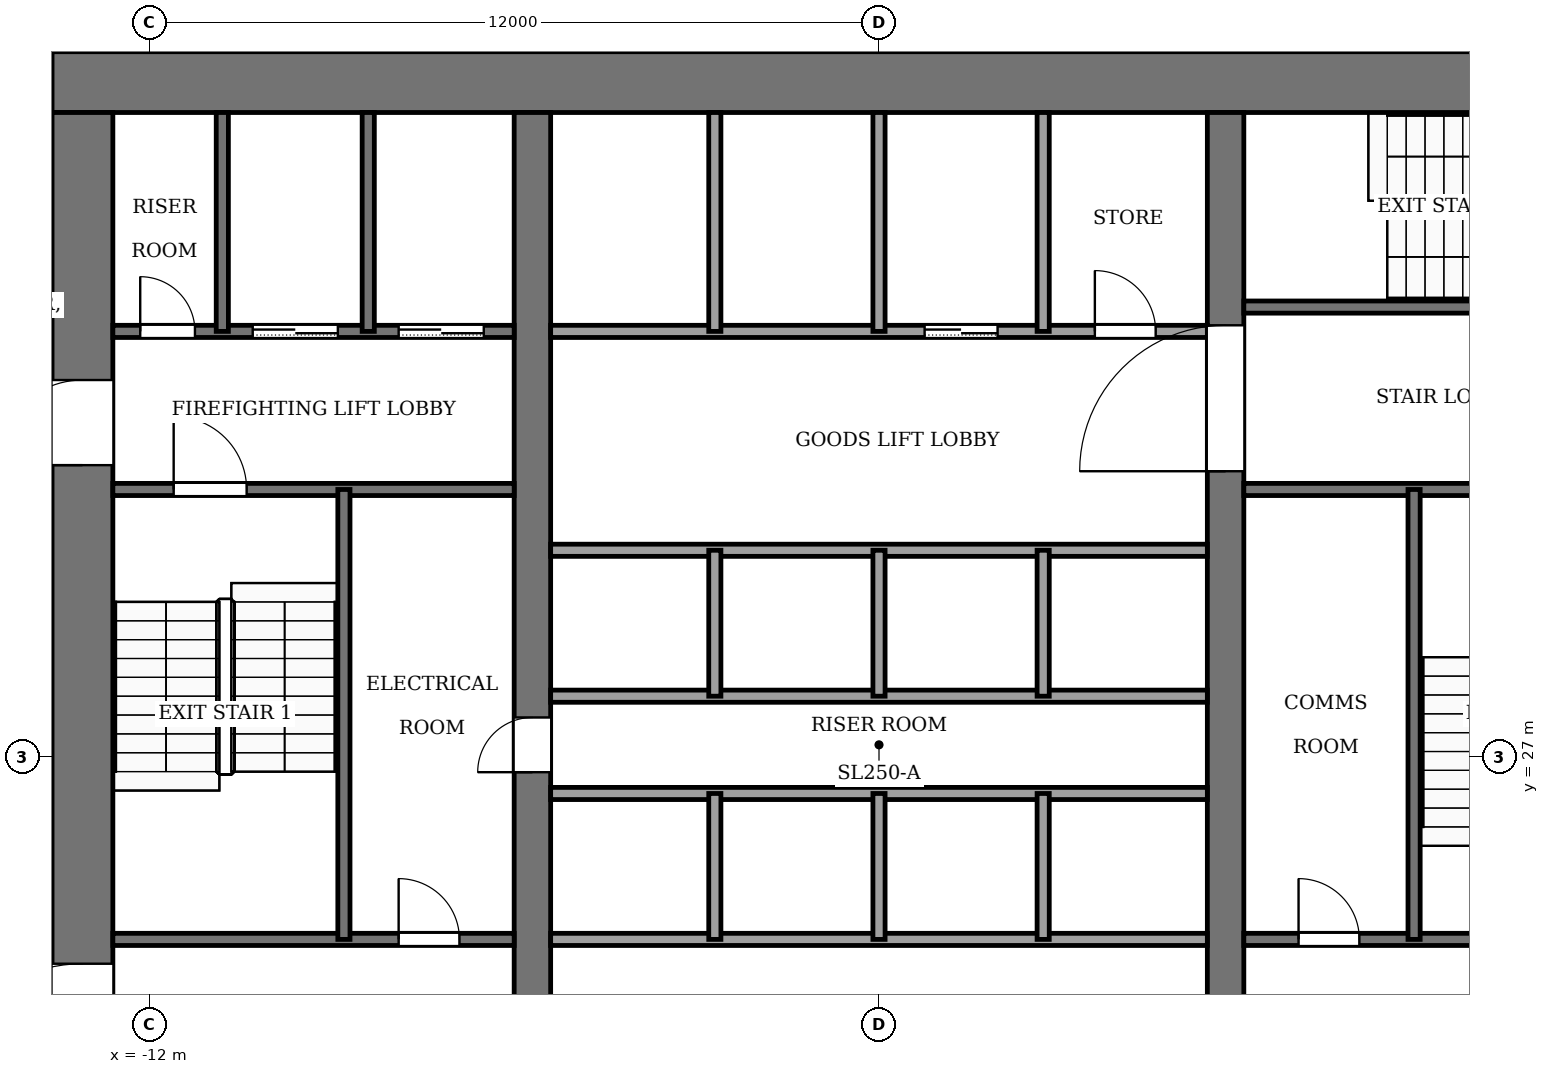
"""IFC4 building model, lengths in metres.
Left out: names, types, materials, properties, quantities, classifications, styles, units other than length and angle.
Written with IfcOpenShell. Run it as: python <this file> out.ifc"""

import sys

from ifc_helpers import new_model, si_unit, direction, frame, frame_2d, origin, place, context, subcontext, project, spatial, rectangle, extrude, element, fill, save


model = new_model("IFC4")
c1 = context("Model", 3, precision=1e-05, world=origin(), true_north=direction((0.0, 1.0)))
c2 = subcontext(c1, "Body", "Model", "MODEL_VIEW")
j1 = project(units=[si_unit("LENGTHUNIT", "METRE"), si_unit("PLANEANGLEUNIT", "RADIAN")], contexts=[c1])
p1 = place(None, origin())
s1 = spatial("IfcSite", under=j1, at=p1, CompositionType="ELEMENT")
p2 = place(p1, origin())
s2 = spatial("IfcBuilding", under=s1, at=p2, CompositionType="ELEMENT")
p3 = place(p2, frame((0.0, 0.0, 170.0)))
s3 = spatial("IfcBuildingStorey", under=s2, at=p3, CompositionType="ELEMENT", Elevation=170.0)
p4 = place(p3, frame((-13.6, 38.1, -0.25), z_axis=(0.0, 0.0, 1.0), x_axis=(1.0, 0.0, 0.0)))
e1 = element("IfcWall", 1, at=p4, inside=s3, PredefinedType="SHEAR", context=c2, shape_type="SweptSolid", body=[
    extrude(rectangle(XDim=27.2, YDim=1.0, at=frame_2d((13.6, 0.0))), origin(), (0.0, 0.0, 1.0), 7.12),
])
p5 = place(p3, frame((-13.1, 18.4, -0.25), z_axis=(0.0, 0.0, 1.0), x_axis=(0.0, 1.0, 0.0)))
e2 = element("IfcWall", 2, at=p5, inside=s3, PredefinedType="SHEAR", context=c2, shape_type="SweptSolid", body=[
    extrude(rectangle(XDim=19.2, YDim=1.0, at=frame_2d((9.6, 0.0))), origin(), (0.0, 0.0, 1.0), 7.12),
])
p6 = place(p5, frame((2.8, 0.0, 0.25)))
e3 = element("IfcOpeningElement", 3, at=p6, cuts=e2, PredefinedType="OPENING", context=c2, shape_type="SweptSolid", body=[
    extrude(rectangle(XDim=2.4, YDim=2.4, at=frame_2d((1.2, 1.2))), frame((0.0, 0.51, 0.0), z_axis=(0.0, -1.0, 0.0), x_axis=(1.0, 0.0, 0.0)), (0.0, 0.0, 1.0), 1.02),
])
p7 = place(p5, frame((13.4, 0.0, 0.25)))
e4 = element("IfcOpeningElement", 4, at=p7, cuts=e2, PredefinedType="OPENING", context=c2, shape_type="SweptSolid", body=[
    extrude(rectangle(XDim=1.4, YDim=2.2, at=frame_2d((0.7, 1.1))), frame((0.0, 0.51, 0.0), z_axis=(0.0, -1.0, 0.0), x_axis=(1.0, 0.0, 0.0)), (0.0, 0.0, 1.0), 1.02),
])
p8 = place(p3, frame((-5.7, 18.4, -0.25), z_axis=(0.0, 0.0, 1.0), x_axis=(0.0, 1.0, 0.0)))
e5 = element("IfcWall", 5, at=p8, inside=s3, PredefinedType="SHEAR", context=c2, shape_type="SweptSolid", body=[
    extrude(rectangle(XDim=19.2, YDim=0.6, at=frame_2d((9.6, 0.0))), origin(), (0.0, 0.0, 1.0), 7.12),
])
p9 = place(p8, frame((8.35, 0.0, 0.25)))
e6 = element("IfcOpeningElement", 6, at=p9, cuts=e5, PredefinedType="OPENING", context=c2, shape_type="SweptSolid", body=[
    extrude(rectangle(XDim=0.9, YDim=2.1, at=frame_2d((0.45, 1.05))), frame((0.0, 0.31, 0.0), z_axis=(0.0, -1.0, 0.0), x_axis=(1.0, 0.0, 0.0)), (0.0, 0.0, 1.0), 0.62),
])
p10 = place(p3, frame((5.7, 18.4, -0.25), z_axis=(0.0, 0.0, 1.0), x_axis=(0.0, 1.0, 0.0)))
e7 = element("IfcWall", 7, at=p10, inside=s3, PredefinedType="SHEAR", context=c2, shape_type="SweptSolid", body=[
    extrude(rectangle(XDim=19.2, YDim=0.6, at=frame_2d((9.6, 0.0))), origin(), (0.0, 0.0, 1.0), 7.12),
])
p11 = place(p10, frame((13.3, 0.0, 0.25)))
e8 = element("IfcOpeningElement", 8, at=p11, cuts=e7, PredefinedType="OPENING", context=c2, shape_type="SweptSolid", body=[
    extrude(rectangle(XDim=2.4, YDim=2.4, at=frame_2d((1.2, 1.2))), frame((0.0, 0.31, 0.0), z_axis=(0.0, -1.0, 0.0), x_axis=(1.0, 0.0, 0.0)), (0.0, 0.0, 1.0), 0.62),
])
p12 = place(p3, frame((-12.6, 24.0, 0.0), z_axis=(0.0, 0.0, 1.0), x_axis=(1.0, 0.0, 0.0)))
e9 = element("IfcWall", 9, at=p12, inside=s3, PredefinedType="PARTITIONING", context=c2, shape_type="SweptSolid", body=[
    extrude(rectangle(XDim=6.6, YDim=0.2, at=frame_2d((3.3, 0.0))), origin(), (0.0, 0.0, 1.0), 6.87),
])
p13 = place(p12, frame((4.7, 0.0, 0.0)))
e10 = element("IfcOpeningElement", 10, at=p13, cuts=e9, PredefinedType="OPENING", context=c2, shape_type="SweptSolid", body=[
    extrude(rectangle(XDim=1.0, YDim=2.1, at=frame_2d((0.5, 1.05))), frame((0.0, 0.11, 0.0), z_axis=(0.0, -1.0, 0.0), x_axis=(1.0, 0.0, 0.0)), (0.0, 0.0, 1.0), 0.22),
])
p14 = place(p3, frame((-5.4, 24.0, 0.0), z_axis=(0.0, 0.0, 1.0), x_axis=(1.0, 0.0, 0.0)))
e11 = element("IfcWall", 11, at=p14, inside=s3, PredefinedType="PARTITIONING", context=c2, shape_type="SweptSolid", body=[
    extrude(rectangle(XDim=10.8, YDim=0.2, at=frame_2d((5.4, 0.0))), origin(), (0.0, 0.0, 1.0), 6.87),
])
p15 = place(p3, frame((6.0, 24.0, 0.0), z_axis=(0.0, 0.0, 1.0), x_axis=(1.0, 0.0, 0.0)))
e12 = element("IfcWall", 12, at=p15, inside=s3, PredefinedType="PARTITIONING", context=c2, shape_type="SweptSolid", body=[
    extrude(rectangle(XDim=6.6, YDim=0.2, at=frame_2d((3.3, 0.0))), origin(), (0.0, 0.0, 1.0), 6.87),
])
p16 = place(p15, frame((0.9, 0.0, 0.0)))
e13 = element("IfcOpeningElement", 13, at=p16, cuts=e12, PredefinedType="OPENING", context=c2, shape_type="SweptSolid", body=[
    extrude(rectangle(XDim=1.0, YDim=2.1, at=frame_2d((0.5, 1.05))), frame((0.0, 0.11, 0.0), z_axis=(0.0, -1.0, 0.0), x_axis=(1.0, 0.0, 0.0)), (0.0, 0.0, 1.0), 0.22),
])
p17 = place(p15, frame((4.4, 0.0, 0.0)))
e14 = element("IfcOpeningElement", 14, at=p17, cuts=e12, PredefinedType="OPENING", context=c2, shape_type="SweptSolid", body=[
    extrude(rectangle(XDim=1.2, YDim=2.2, at=frame_2d((0.6, 1.1))), frame((0.0, 0.11, 0.0), z_axis=(0.0, -1.0, 0.0), x_axis=(1.0, 0.0, 0.0)), (0.0, 0.0, 1.0), 0.22),
])
for number, where, z_axis, x_axis in (
    (15, (-5.4, 26.4, 0.0), (0.0, 0.0, 1.0), (1.0, 0.0, 0.0)),
    (16, (-5.4, 28.0, 0.0), (0.0, 0.0, 1.0), (1.0, 0.0, 0.0)),
    (17, (-5.4, 30.4, 0.0), (0.0, 0.0, 1.0), (1.0, 0.0, 0.0)),
):
    element("IfcWall", number, at=place(p3, frame(where, z_axis=z_axis, x_axis=x_axis)), inside=s3, PredefinedType="PARTITIONING", context=c2, shape_type="SweptSolid", body=[
        extrude(rectangle(XDim=10.8, YDim=0.2, at=frame_2d((5.4, 0.0))), origin(), (0.0, 0.0, 1.0), 6.87),
    ])
p18 = place(p3, frame((-12.6, 31.4, 0.0), z_axis=(0.0, 0.0, 1.0), x_axis=(1.0, 0.0, 0.0)))
e18 = element("IfcWall", 18, at=p18, inside=s3, PredefinedType="PARTITIONING", context=c2, shape_type="SweptSolid", body=[
    extrude(rectangle(XDim=6.6, YDim=0.2, at=frame_2d((3.3, 0.0))), origin(), (0.0, 0.0, 1.0), 6.87),
])
p19 = place(p18, frame((1.0, 0.0, 0.0)))
e19 = element("IfcOpeningElement", 19, at=p19, cuts=e18, PredefinedType="OPENING", context=c2, shape_type="SweptSolid", body=[
    extrude(rectangle(XDim=1.2, YDim=2.2, at=frame_2d((0.6, 1.1))), frame((0.0, 0.11, 0.0), z_axis=(0.0, -1.0, 0.0), x_axis=(1.0, 0.0, 0.0)), (0.0, 0.0, 1.0), 0.22),
])
p20 = place(p3, frame((6.0, 31.4, 0.0), z_axis=(0.0, 0.0, 1.0), x_axis=(1.0, 0.0, 0.0)))
e20 = element("IfcWall", 20, at=p20, inside=s3, PredefinedType="PARTITIONING", context=c2, shape_type="SweptSolid", body=[
    extrude(rectangle(XDim=6.6, YDim=0.2, at=frame_2d((3.3, 0.0))), origin(), (0.0, 0.0, 1.0), 6.87),
])
p21 = place(p3, frame((-12.6, 34.0, 0.0), z_axis=(0.0, 0.0, 1.0), x_axis=(1.0, 0.0, 0.0)))
e21 = element("IfcWall", 21, at=p21, inside=s3, PredefinedType="PARTITIONING", context=c2, shape_type="SweptSolid", body=[
    extrude(rectangle(XDim=6.6, YDim=0.2, at=frame_2d((3.3, 0.0))), origin(), (0.0, 0.0, 1.0), 6.87),
])
p22 = place(p21, frame((4.7, 0.0, 0.0)))
e22 = element("IfcOpeningElement", 22, at=p22, cuts=e21, PredefinedType="OPENING", context=c2, shape_type="SweptSolid", body=[
    extrude(rectangle(XDim=1.4, YDim=2.2, at=frame_2d((0.7, 1.1))), frame((0.0, 0.11, 0.0), z_axis=(0.0, -1.0, 0.0), x_axis=(1.0, 0.0, 0.0)), (0.0, 0.0, 1.0), 0.22),
])
p23 = place(p21, frame((2.3, 0.0, 0.0)))
e23 = element("IfcOpeningElement", 23, at=p23, cuts=e21, PredefinedType="OPENING", context=c2, shape_type="SweptSolid", body=[
    extrude(rectangle(XDim=1.4, YDim=2.2, at=frame_2d((0.7, 1.1))), frame((0.0, 0.11, 0.0), z_axis=(0.0, -1.0, 0.0), x_axis=(1.0, 0.0, 0.0)), (0.0, 0.0, 1.0), 0.22),
])
p24 = place(p21, frame((0.45, 0.0, 0.0)))
e24 = element("IfcOpeningElement", 24, at=p24, cuts=e21, PredefinedType="OPENING", context=c2, shape_type="SweptSolid", body=[
    extrude(rectangle(XDim=0.9, YDim=2.1, at=frame_2d((0.45, 1.05))), frame((0.0, 0.11, 0.0), z_axis=(0.0, -1.0, 0.0), x_axis=(1.0, 0.0, 0.0)), (0.0, 0.0, 1.0), 0.22),
])
p25 = place(p3, frame((-5.4, 34.0, 0.0), z_axis=(0.0, 0.0, 1.0), x_axis=(1.0, 0.0, 0.0)))
e25 = element("IfcWall", 25, at=p25, inside=s3, PredefinedType="PARTITIONING", context=c2, shape_type="SweptSolid", body=[
    extrude(rectangle(XDim=10.8, YDim=0.2, at=frame_2d((5.4, 0.0))), origin(), (0.0, 0.0, 1.0), 6.87),
])
p26 = place(p25, frame((6.15, 0.0, 0.0)))
e26 = element("IfcOpeningElement", 26, at=p26, cuts=e25, PredefinedType="OPENING", context=c2, shape_type="SweptSolid", body=[
    extrude(rectangle(XDim=1.2, YDim=2.2, at=frame_2d((0.6, 1.1))), frame((0.0, 0.11, 0.0), z_axis=(0.0, -1.0, 0.0), x_axis=(1.0, 0.0, 0.0)), (0.0, 0.0, 1.0), 0.22),
])
p27 = place(p25, frame((8.95, 0.0, 0.0)))
e27 = element("IfcOpeningElement", 27, at=p27, cuts=e25, PredefinedType="OPENING", context=c2, shape_type="SweptSolid", body=[
    extrude(rectangle(XDim=1.0, YDim=2.1, at=frame_2d((0.5, 1.05))), frame((0.0, 0.11, 0.0), z_axis=(0.0, -1.0, 0.0), x_axis=(1.0, 0.0, 0.0)), (0.0, 0.0, 1.0), 0.22),
])
p28 = place(p3, frame((6.0, 34.4, 0.0), z_axis=(0.0, 0.0, 1.0), x_axis=(1.0, 0.0, 0.0)))
e28 = element("IfcWall", 28, at=p28, inside=s3, PredefinedType="PARTITIONING", context=c2, shape_type="SweptSolid", body=[
    extrude(rectangle(XDim=6.6, YDim=0.2, at=frame_2d((3.3, 0.0))), origin(), (0.0, 0.0, 1.0), 6.87),
])
p29 = place(p28, frame((4.8, 0.0, 0.0)))
e29 = element("IfcOpeningElement", 29, at=p29, cuts=e28, PredefinedType="OPENING", context=c2, shape_type="SweptSolid", body=[
    extrude(rectangle(XDim=1.2, YDim=2.2, at=frame_2d((0.6, 1.1))), frame((0.0, 0.11, 0.0), z_axis=(0.0, -1.0, 0.0), x_axis=(1.0, 0.0, 0.0)), (0.0, 0.0, 1.0), 0.22),
])
p30 = place(p3, frame((-10.8, 34.0, 0.0), z_axis=(0.0, 0.0, 1.0), x_axis=(0.0, 1.0, 0.0)))
e30 = element("IfcWall", 30, at=p30, inside=s3, PredefinedType="PARTITIONING", context=c2, shape_type="SweptSolid", body=[
    extrude(rectangle(XDim=3.6, YDim=0.2, at=frame_2d((1.8, 0.0))), origin(), (0.0, 0.0, 1.0), 6.87),
])
p31 = place(p3, frame((-8.8, 24.0, 0.0), z_axis=(0.0, 0.0, 1.0), x_axis=(0.0, 1.0, 0.0)))
e31 = element("IfcWall", 31, at=p31, inside=s3, PredefinedType="PARTITIONING", context=c2, shape_type="SweptSolid", body=[
    extrude(rectangle(XDim=7.4, YDim=0.2, at=frame_2d((3.7, 0.0))), origin(), (0.0, 0.0, 1.0), 6.87),
])
p32 = place(p3, frame((-8.4, 34.0, 0.0), z_axis=(0.0, 0.0, 1.0), x_axis=(0.0, 1.0, 0.0)))
e32 = element("IfcWall", 32, at=p32, inside=s3, PredefinedType="PARTITIONING", context=c2, shape_type="SweptSolid", body=[
    extrude(rectangle(XDim=3.6, YDim=0.2, at=frame_2d((1.8, 0.0))), origin(), (0.0, 0.0, 1.0), 6.87),
])
for number, where, z_axis, x_axis in (
    (33, (-2.7, 24.0, 0.0), (0.0, 0.0, 1.0), (0.0, 1.0, 0.0)),
    (34, (-2.7, 28.0, 0.0), (0.0, 0.0, 1.0), (0.0, 1.0, 0.0)),
):
    element("IfcWall", number, at=place(p3, frame(where, z_axis=z_axis, x_axis=x_axis)), inside=s3, PredefinedType="PARTITIONING", context=c2, shape_type="SweptSolid", body=[
        extrude(rectangle(XDim=2.4, YDim=0.2, at=frame_2d((1.2, 0.0))), origin(), (0.0, 0.0, 1.0), 6.87),
    ])
p33 = place(p3, frame((-2.7, 34.0, 0.0), z_axis=(0.0, 0.0, 1.0), x_axis=(0.0, 1.0, 0.0)))
e35 = element("IfcWall", 35, at=p33, inside=s3, PredefinedType="PARTITIONING", context=c2, shape_type="SweptSolid", body=[
    extrude(rectangle(XDim=3.6, YDim=0.2, at=frame_2d((1.8, 0.0))), origin(), (0.0, 0.0, 1.0), 6.87),
])
for number, where, z_axis, x_axis in (
    (36, (0.0, 24.0, 0.0), (0.0, 0.0, 1.0), (0.0, 1.0, 0.0)),
    (37, (0.0, 28.0, 0.0), (0.0, 0.0, 1.0), (0.0, 1.0, 0.0)),
):
    element("IfcWall", number, at=place(p3, frame(where, z_axis=z_axis, x_axis=x_axis)), inside=s3, PredefinedType="PARTITIONING", context=c2, shape_type="SweptSolid", body=[
        extrude(rectangle(XDim=2.4, YDim=0.2, at=frame_2d((1.2, 0.0))), origin(), (0.0, 0.0, 1.0), 6.87),
    ])
p34 = place(p3, frame((0.0, 34.0, 0.0), z_axis=(0.0, 0.0, 1.0), x_axis=(0.0, 1.0, 0.0)))
e38 = element("IfcWall", 38, at=p34, inside=s3, PredefinedType="PARTITIONING", context=c2, shape_type="SweptSolid", body=[
    extrude(rectangle(XDim=3.6, YDim=0.2, at=frame_2d((1.8, 0.0))), origin(), (0.0, 0.0, 1.0), 6.87),
])
for number, where, z_axis, x_axis in (
    (39, (2.7, 24.0, 0.0), (0.0, 0.0, 1.0), (0.0, 1.0, 0.0)),
    (40, (2.7, 28.0, 0.0), (0.0, 0.0, 1.0), (0.0, 1.0, 0.0)),
):
    element("IfcWall", number, at=place(p3, frame(where, z_axis=z_axis, x_axis=x_axis)), inside=s3, PredefinedType="PARTITIONING", context=c2, shape_type="SweptSolid", body=[
        extrude(rectangle(XDim=2.4, YDim=0.2, at=frame_2d((1.2, 0.0))), origin(), (0.0, 0.0, 1.0), 6.87),
    ])
p35 = place(p3, frame((2.7, 34.0, 0.0), z_axis=(0.0, 0.0, 1.0), x_axis=(0.0, 1.0, 0.0)))
e41 = element("IfcWall", 41, at=p35, inside=s3, PredefinedType="PARTITIONING", context=c2, shape_type="SweptSolid", body=[
    extrude(rectangle(XDim=3.6, YDim=0.2, at=frame_2d((1.8, 0.0))), origin(), (0.0, 0.0, 1.0), 6.87),
])
p36 = place(p3, frame((8.8, 24.0, 0.0), z_axis=(0.0, 0.0, 1.0), x_axis=(0.0, 1.0, 0.0)))
e42 = element("IfcWall", 42, at=p36, inside=s3, PredefinedType="PARTITIONING", context=c2, shape_type="SweptSolid", body=[
    extrude(rectangle(XDim=7.4, YDim=0.2, at=frame_2d((3.7, 0.0))), origin(), (0.0, 0.0, 1.0), 6.87),
])
p37 = place(p26, origin())
e43 = element("IfcDoor", 43, at=p37, inside=s3, OperationType="SLIDING_TO_LEFT", PredefinedType="DOOR", context=c2, shape_type="SweptSolid", body=[
    extrude(rectangle(XDim=1.2, YDim=2.2, at=frame_2d((0.6, 1.1))), frame((0.0, 0.025, 0.0), z_axis=(0.0, -1.0, 0.0), x_axis=(1.0, 0.0, 0.0)), (0.0, 0.0, 1.0), 0.05),
])
fill(e26, e43)
p38 = place(p22, origin())
e44 = element("IfcDoor", 44, at=p38, inside=s3, OperationType="SLIDING_TO_LEFT", PredefinedType="DOOR", context=c2, shape_type="SweptSolid", body=[
    extrude(rectangle(XDim=1.4, YDim=2.2, at=frame_2d((0.7, 1.1))), frame((0.0, 0.025, 0.0), z_axis=(0.0, -1.0, 0.0), x_axis=(1.0, 0.0, 0.0)), (0.0, 0.0, 1.0), 0.05),
])
fill(e22, e44)
p39 = place(p23, origin())
e45 = element("IfcDoor", 45, at=p39, inside=s3, OperationType="SLIDING_TO_LEFT", PredefinedType="DOOR", context=c2, shape_type="SweptSolid", body=[
    extrude(rectangle(XDim=1.4, YDim=2.2, at=frame_2d((0.7, 1.1))), frame((0.0, 0.025, 0.0), z_axis=(0.0, -1.0, 0.0), x_axis=(1.0, 0.0, 0.0)), (0.0, 0.0, 1.0), 0.05),
])
fill(e23, e45)
p40 = place(p24, origin())
e46 = element("IfcDoor", 46, at=p40, inside=s3, OperationType="SINGLE_SWING_RIGHT", PredefinedType="DOOR", context=c2, shape_type="SweptSolid", body=[
    extrude(rectangle(XDim=0.9, YDim=2.1, at=frame_2d((0.45, 1.05))), frame((0.0, 0.025, 0.0), z_axis=(0.0, -1.0, 0.0), x_axis=(1.0, 0.0, 0.0)), (0.0, 0.0, 1.0), 0.05),
])
fill(e24, e46)
p41 = place(p13, origin())
e47 = element("IfcDoor", 47, at=p41, inside=s3, OperationType="SINGLE_SWING_RIGHT", PredefinedType="DOOR", context=c2, shape_type="SweptSolid", body=[
    extrude(rectangle(XDim=1.0, YDim=2.1, at=frame_2d((0.5, 1.05))), frame((0.0, 0.025, 0.0), z_axis=(0.0, -1.0, 0.0), x_axis=(1.0, 0.0, 0.0)), (0.0, 0.0, 1.0), 0.05),
])
fill(e10, e47)
p42 = place(p16, origin())
e48 = element("IfcDoor", 48, at=p42, inside=s3, OperationType="SINGLE_SWING_LEFT", PredefinedType="DOOR", context=c2, shape_type="SweptSolid", body=[
    extrude(rectangle(XDim=1.0, YDim=2.1, at=frame_2d((0.5, 1.05))), frame((0.0, 0.025, 0.0), z_axis=(0.0, -1.0, 0.0), x_axis=(1.0, 0.0, 0.0)), (0.0, 0.0, 1.0), 0.05),
])
fill(e13, e48)
p43 = place(p27, origin())
e49 = element("IfcDoor", 49, at=p43, inside=s3, OperationType="SINGLE_SWING_LEFT", PredefinedType="DOOR", context=c2, shape_type="SweptSolid", body=[
    extrude(rectangle(XDim=1.0, YDim=2.1, at=frame_2d((0.5, 1.05))), frame((0.0, 0.025, 0.0), z_axis=(0.0, -1.0, 0.0), x_axis=(1.0, 0.0, 0.0)), (0.0, 0.0, 1.0), 0.05),
])
fill(e27, e49)
p44 = place(p9, origin())
e50 = element("IfcDoor", 50, at=p44, inside=s3, OperationType="SINGLE_SWING_RIGHT", PredefinedType="DOOR", context=c2, shape_type="SweptSolid", body=[
    extrude(rectangle(XDim=0.9, YDim=2.1, at=frame_2d((0.45, 1.05))), frame((0.0, 0.025, 0.0), z_axis=(0.0, -1.0, 0.0), x_axis=(1.0, 0.0, 0.0)), (0.0, 0.0, 1.0), 0.05),
])
fill(e6, e50)
p45 = place(p19, origin())
e51 = element("IfcDoor", 51, at=p45, inside=s3, OperationType="SINGLE_SWING_RIGHT", PredefinedType="DOOR", context=c2, shape_type="SweptSolid", body=[
    extrude(rectangle(XDim=1.2, YDim=2.2, at=frame_2d((0.6, 1.1))), frame((0.0, 0.025, 0.0), z_axis=(0.0, -1.0, 0.0), x_axis=(1.0, 0.0, 0.0)), (0.0, 0.0, 1.0), 0.05),
])
fill(e19, e51)
p46 = place(p11, origin())
e52 = element("IfcDoor", 52, at=p46, inside=s3, OperationType="DOUBLE_DOOR_SINGLE_SWING", PredefinedType="DOOR", context=c2, shape_type="SweptSolid", body=[
    extrude(rectangle(XDim=2.4, YDim=2.4, at=frame_2d((1.2, 1.2))), frame((0.0, 0.025, 0.0), z_axis=(0.0, -1.0, 0.0), x_axis=(1.0, 0.0, 0.0)), (0.0, 0.0, 1.0), 0.05),
])
fill(e8, e52)
p47 = place(p6, origin())
e53 = element("IfcDoor", 53, at=p47, inside=s3, OperationType="DOUBLE_DOOR_SINGLE_SWING", PredefinedType="DOOR", context=c2, shape_type="SweptSolid", body=[
    extrude(rectangle(XDim=2.4, YDim=2.4, at=frame_2d((1.2, 1.2))), frame((0.0, 0.025, 0.0), z_axis=(0.0, -1.0, 0.0), x_axis=(1.0, 0.0, 0.0)), (0.0, 0.0, 1.0), 0.05),
])
fill(e3, e53)
p48 = place(p7, origin())
e54 = element("IfcDoor", 54, at=p48, inside=s3, OperationType="SINGLE_SWING_RIGHT", PredefinedType="DOOR", context=c2, shape_type="SweptSolid", body=[
    extrude(rectangle(XDim=1.4, YDim=2.2, at=frame_2d((0.7, 1.1))), frame((0.0, 0.025, 0.0), z_axis=(0.0, -1.0, 0.0), x_axis=(1.0, 0.0, 0.0)), (0.0, 0.0, 1.0), 0.05),
])
fill(e4, e54)
save(model, sys.argv[1])
